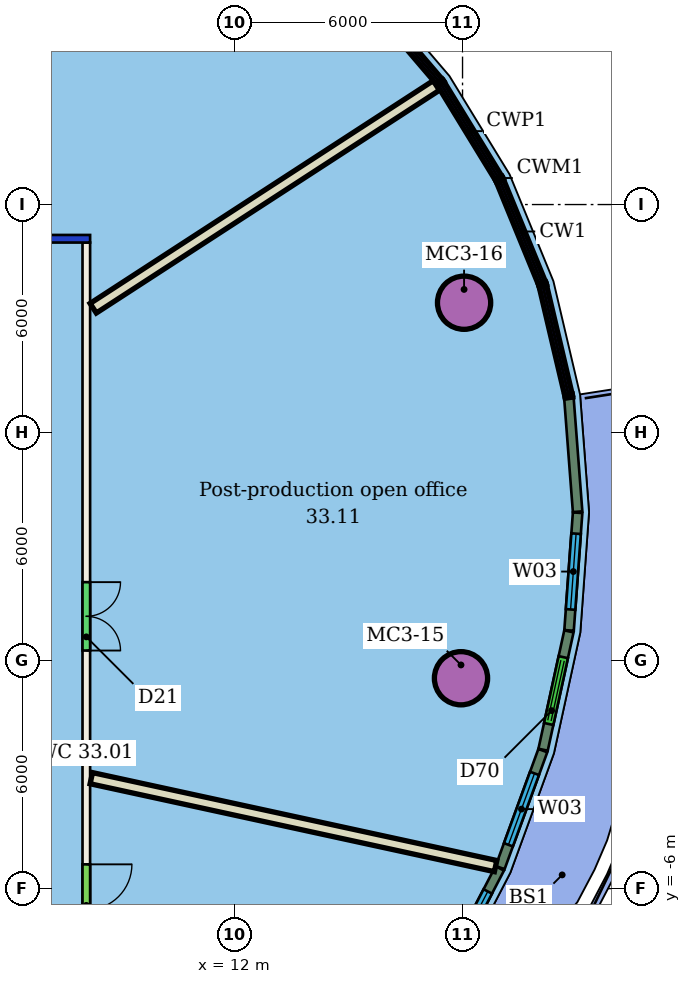
"""IFC4 building model, lengths in metres.
Left out: names, types, materials, properties, quantities, classifications, styles, units other than length and angle.
Written with IfcOpenShell. Run it as: python <this file> out.ifc"""

import sys

from ifc_helpers import new_model, si_unit, direction, frame, frame_2d, origin, origin_2d, place, context, subcontext, project, spatial, rectangle, hollow_circle, extrude, element, fill, save


model = new_model("IFC4")
c1 = context("Model", 3, precision=1e-05, world=origin(), true_north=direction((0.0, 1.0)))
c2 = subcontext(c1, "Body", "Model", "MODEL_VIEW")
j1 = project(units=[si_unit("LENGTHUNIT", "METRE"), si_unit("PLANEANGLEUNIT", "RADIAN")], contexts=[c1])
p1 = place(None, origin())
s1 = spatial("IfcSite", under=j1, at=p1, CompositionType="ELEMENT")
p2 = place(p1, origin())
s2 = spatial("IfcBuilding", under=s1, at=p2, CompositionType="ELEMENT")
p3 = place(p2, frame((0.0, 0.0, 143.4)))
s3 = spatial("IfcBuildingStorey", under=s2, at=p3, CompositionType="ELEMENT", Elevation=143.4)
for number, where, z_axis, x_axis in (
    (1, (17.959, -0.464, 0.0), (0.0, 0.0, 1.0), (1.0, 0.0, 0.0)),
    (2, (18.041, 9.417, 0.0), (0.0, 0.0, 1.0), (1.0, 0.0, 0.0)),
):
    element("IfcColumn", number, at=place(p3, frame(where, z_axis=z_axis, x_axis=x_axis)), inside=s3, PredefinedType="COLUMN", context=c2, shape_type="SweptSolid", body=[
        extrude(hollow_circle(Radius=0.7, WallThickness=0.05, at=origin_2d()), origin(), (0.0, 0.0, 1.0), 3.45),
    ])
p4 = place(p3, frame((-20.2, 11.1, 0.0), z_axis=(0.0, 0.0, 1.0), x_axis=(1.0, 0.0, 0.0)))
e3 = element("IfcWall", 3, at=p4, inside=s3, PredefinedType="PARTITIONING", context=c2, shape_type="SweptSolid", body=[
    extrude(rectangle(XDim=28.4, YDim=0.2, at=frame_2d((14.2, 0.0))), origin(), (0.0, 0.0, 1.0), 3.05),
])
p5 = place(p4, frame((20.641, 0.0, 0.0)))
e4 = element("IfcOpeningElement", 4, at=p5, cuts=e3, PredefinedType="OPENING", context=c2, shape_type="SweptSolid", body=[
    extrude(rectangle(XDim=1.1, YDim=2.1, at=frame_2d((0.55, 1.05))), frame((0.0, 0.11, 0.0), z_axis=(0.0, -1.0, 0.0), x_axis=(1.0, 0.0, 0.0)), (0.0, 0.0, 1.0), 0.22),
])
p6 = place(p4, frame((12.589, 0.0, 0.0)))
e5 = element("IfcOpeningElement", 5, at=p6, cuts=e3, PredefinedType="OPENING", context=c2, shape_type="SweptSolid", body=[
    extrude(rectangle(XDim=1.0, YDim=2.1, at=frame_2d((0.5, 1.05))), frame((0.0, 0.11, 0.0), z_axis=(0.0, -1.0, 0.0), x_axis=(1.0, 0.0, 0.0)), (0.0, 0.0, 1.0), 0.22),
])
p7 = place(p4, frame((8.211, 0.0, 0.0)))
e6 = element("IfcOpeningElement", 6, at=p7, cuts=e3, PredefinedType="OPENING", context=c2, shape_type="SweptSolid", body=[
    extrude(rectangle(XDim=1.2, YDim=2.1, at=frame_2d((0.6, 1.05))), frame((0.0, 0.11, 0.0), z_axis=(0.0, -1.0, 0.0), x_axis=(1.0, 0.0, 0.0)), (0.0, 0.0, 1.0), 0.22),
])
p8 = place(p4, frame((3.191, 0.0, 0.0)))
e7 = element("IfcOpeningElement", 7, at=p8, cuts=e3, PredefinedType="OPENING", context=c2, shape_type="SweptSolid", body=[
    extrude(rectangle(XDim=1.2, YDim=2.1, at=frame_2d((0.6, 1.05))), frame((0.0, 0.11, 0.0), z_axis=(0.0, -1.0, 0.0), x_axis=(1.0, 0.0, 0.0)), (0.0, 0.0, 1.0), 0.22),
])
p9 = place(p3, frame((8.1, 11.0, 0.0), z_axis=(0.0, 0.0, 1.0), x_axis=(0.0, -1.0, 0.0)))
e8 = element("IfcWall", 8, at=p9, inside=s3, PredefinedType="PARTITIONING", context=c2, shape_type="SweptSolid", body=[
    extrude(rectangle(XDim=22.0, YDim=0.2, at=frame_2d((11.0, 0.0))), origin(), (0.0, 0.0, 1.0), 3.45),
])
p10 = place(p9, frame((16.361, 0.0, 0.0)))
e9 = element("IfcOpeningElement", 9, at=p10, cuts=e8, PredefinedType="OPENING", context=c2, shape_type="SweptSolid", body=[
    extrude(rectangle(XDim=1.2, YDim=2.1, at=frame_2d((0.6, 1.05))), frame((0.0, 0.11, 0.0), z_axis=(0.0, -1.0, 0.0), x_axis=(1.0, 0.0, 0.0)), (0.0, 0.0, 1.0), 0.22),
])
p11 = place(p9, frame((8.935, 0.0, 0.0)))
e10 = element("IfcOpeningElement", 10, at=p11, cuts=e8, PredefinedType="OPENING", context=c2, shape_type="SweptSolid", body=[
    extrude(rectangle(XDim=1.8, YDim=2.1, at=frame_2d((0.9, 1.05))), frame((0.0, 0.11, 0.0), z_axis=(0.0, -1.0, 0.0), x_axis=(1.0, 0.0, 0.0)), (0.0, 0.0, 1.0), 0.22),
])
p12 = place(p3, frame((17.311, 15.133, 0.0), z_axis=(0.0, 0.0, 1.0), x_axis=(-0.838747133414, -0.544521116385, 0.0)))
e11 = element("IfcWall", 11, at=p12, inside=s3, PredefinedType="PARTITIONING", context=c2, shape_type="SweptSolid", body=[
    extrude(rectangle(XDim=10.765, YDim=0.3, at=frame_2d((5.382, 0.0))), origin(), (0.0, 0.0, 1.0), 3.45),
])
p13 = place(p3, frame((18.87, -5.406, 0.0), z_axis=(0.0, 0.0, 1.0), x_axis=(-0.977175554344, 0.21243336836, 0.0)))
e12 = element("IfcWall", 12, at=p13, inside=s3, PredefinedType="PARTITIONING", context=c2, shape_type="SweptSolid", body=[
    extrude(rectangle(XDim=10.887, YDim=0.3, at=frame_2d((5.443, 0.0))), origin(), (0.0, 0.0, 1.0), 3.45),
])
p14 = place(p3, frame((17.429, -8.455, 0.0), z_axis=(0.0, 0.0, 1.0), x_axis=(0.460482311848, 0.887668879975, 0.0)))
e13 = element("IfcWall", 13, at=p14, inside=s3, PredefinedType="SOLIDWALL", context=c2, shape_type="SweptSolid", body=[
    extrude(rectangle(XDim=3.366, YDim=0.25, at=frame_2d((1.683, 0.0))), origin(), (0.0, 0.0, 1.0), 3.1),
])
p15 = place(p14, frame((0.683, 0.0, 0.9)))
e14 = element("IfcOpeningElement", 14, at=p15, cuts=e13, PredefinedType="OPENING", context=c2, shape_type="SweptSolid", body=[
    extrude(rectangle(XDim=2.0, YDim=2.1, at=frame_2d((1.0, 1.05))), frame((0.0, 0.135, 0.0), z_axis=(0.0, -1.0, 0.0), x_axis=(1.0, 0.0, 0.0)), (0.0, 0.0, 1.0), 0.27),
])
p16 = place(p3, frame((18.989, -5.446, 0.0), z_axis=(0.0, 0.0, 1.0), x_axis=(0.343106975728, 0.939296334075, 0.0)))
e15 = element("IfcWall", 15, at=p16, inside=s3, PredefinedType="SOLIDWALL", context=c2, shape_type="SweptSolid", body=[
    extrude(rectangle(XDim=3.276, YDim=0.25, at=frame_2d((1.638, 0.0))), origin(), (0.0, 0.0, 1.0), 3.1),
])
p17 = place(p16, frame((0.638, 0.0, 0.9)))
e16 = element("IfcOpeningElement", 16, at=p17, cuts=e15, PredefinedType="OPENING", context=c2, shape_type="SweptSolid", body=[
    extrude(rectangle(XDim=2.0, YDim=2.1, at=frame_2d((1.0, 1.05))), frame((0.0, 0.135, 0.0), z_axis=(0.0, -1.0, 0.0), x_axis=(1.0, 0.0, 0.0)), (0.0, 0.0, 1.0), 0.27),
])
p18 = place(p3, frame((20.12, -2.344, 0.0), z_axis=(0.0, 0.0, 1.0), x_axis=(0.213278759663, 0.976991387207, 0.0)))
e17 = element("IfcWall", 17, at=p18, inside=s3, PredefinedType="SOLIDWALL", context=c2, shape_type="SweptSolid", body=[
    extrude(rectangle(XDim=3.187, YDim=0.25, at=frame_2d((1.593, 0.0))), origin(), (0.0, 0.0, 1.0), 3.1),
])
p19 = place(p18, frame((0.693, 0.0, 0.0)))
e18 = element("IfcOpeningElement", 18, at=p19, cuts=e17, PredefinedType="OPENING", context=c2, shape_type="SweptSolid", body=[
    extrude(rectangle(XDim=1.8, YDim=2.4, at=frame_2d((0.9, 1.2))), frame((0.0, 0.135, 0.0), z_axis=(0.0, -1.0, 0.0), x_axis=(1.0, 0.0, 0.0)), (0.0, 0.0, 1.0), 0.27),
])
p20 = place(p3, frame((20.803, 0.794, 0.0), z_axis=(0.0, 0.0, 1.0), x_axis=(0.072576937858, 0.997362816678, 0.0)))
e19 = element("IfcWall", 19, at=p20, inside=s3, PredefinedType="SOLIDWALL", context=c2, shape_type="SweptSolid", body=[
    extrude(rectangle(XDim=3.105, YDim=0.25, at=frame_2d((1.552, 0.0))), origin(), (0.0, 0.0, 1.0), 3.1),
])
p21 = place(p20, frame((0.552, 0.0, 0.9)))
e20 = element("IfcOpeningElement", 20, at=p21, cuts=e19, PredefinedType="OPENING", context=c2, shape_type="SweptSolid", body=[
    extrude(rectangle(XDim=2.0, YDim=2.1, at=frame_2d((1.0, 1.05))), frame((0.0, 0.135, 0.0), z_axis=(0.0, -1.0, 0.0), x_axis=(1.0, 0.0, 0.0)), (0.0, 0.0, 1.0), 0.27),
])
p22 = place(p3, frame((21.028, 3.918, 0.0), z_axis=(0.0, 0.0, 1.0), x_axis=(-0.076384798739, 0.997078413427, 0.0)))
e21 = element("IfcWall", 21, at=p22, inside=s3, PredefinedType="SOLIDWALL", context=c2, shape_type="SweptSolid", body=[
    extrude(rectangle(XDim=2.995, YDim=0.25, at=frame_2d((1.498, 0.0))), origin(), (0.0, 0.0, 1.0), 3.1),
])
p23 = place(p10, origin())
e22 = element("IfcDoor", 22, at=p23, inside=s3, OperationType="SINGLE_SWING_LEFT", PredefinedType="DOOR", context=c2, shape_type="SweptSolid", body=[
    extrude(rectangle(XDim=1.2, YDim=2.1, at=frame_2d((0.6, 1.05))), frame((0.0, 0.025, 0.0), z_axis=(0.0, -1.0, 0.0), x_axis=(1.0, 0.0, 0.0)), (0.0, 0.0, 1.0), 0.05),
])
fill(e9, e22)
p24 = place(p11, origin())
e23 = element("IfcDoor", 23, at=p24, inside=s3, OperationType="DOUBLE_DOOR_SINGLE_SWING", PredefinedType="DOOR", context=c2, shape_type="SweptSolid", body=[
    extrude(rectangle(XDim=1.8, YDim=2.1, at=frame_2d((0.9, 1.05))), frame((0.0, 0.025, 0.0), z_axis=(0.0, -1.0, 0.0), x_axis=(1.0, 0.0, 0.0)), (0.0, 0.0, 1.0), 0.05),
])
fill(e10, e23)
p25 = place(p15, origin())
e24 = element("IfcWindow", 24, at=p25, inside=s3, PartitioningType="SINGLE_PANEL", PredefinedType="WINDOW", context=c2, shape_type="SweptSolid", body=[
    extrude(rectangle(XDim=2.0, YDim=2.1, at=frame_2d((1.0, 1.05))), frame((0.0, 0.03, 0.0), z_axis=(0.0, -1.0, 0.0), x_axis=(1.0, 0.0, 0.0)), (0.0, 0.0, 1.0), 0.06),
])
fill(e14, e24)
p26 = place(p17, origin())
e25 = element("IfcWindow", 25, at=p26, inside=s3, PartitioningType="SINGLE_PANEL", PredefinedType="WINDOW", context=c2, shape_type="SweptSolid", body=[
    extrude(rectangle(XDim=2.0, YDim=2.1, at=frame_2d((1.0, 1.05))), frame((0.0, 0.03, 0.0), z_axis=(0.0, -1.0, 0.0), x_axis=(1.0, 0.0, 0.0)), (0.0, 0.0, 1.0), 0.06),
])
fill(e16, e25)
p27 = place(p19, origin())
e26 = element("IfcDoor", 26, at=p27, inside=s3, OperationType="DOUBLE_DOOR_SLIDING", PredefinedType="DOOR", context=c2, shape_type="SweptSolid", body=[
    extrude(rectangle(XDim=1.8, YDim=2.4, at=frame_2d((0.9, 1.2))), frame((0.0, 0.025, 0.0), z_axis=(0.0, -1.0, 0.0), x_axis=(1.0, 0.0, 0.0)), (0.0, 0.0, 1.0), 0.05),
])
fill(e18, e26)
p28 = place(p21, origin())
e27 = element("IfcWindow", 27, at=p28, inside=s3, PartitioningType="SINGLE_PANEL", PredefinedType="WINDOW", context=c2, shape_type="SweptSolid", body=[
    extrude(rectangle(XDim=2.0, YDim=2.1, at=frame_2d((1.0, 1.05))), frame((0.0, 0.03, 0.0), z_axis=(0.0, -1.0, 0.0), x_axis=(1.0, 0.0, 0.0)), (0.0, 0.0, 1.0), 0.06),
])
fill(e20, e27)
save(model, sys.argv[1])
